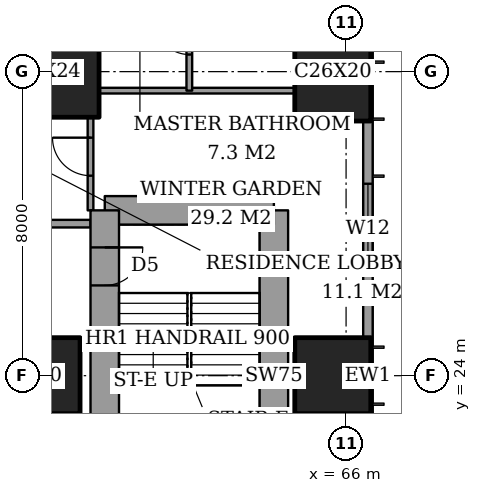
"""IFC4 building model, lengths in metres.
Left out: names, types, materials, properties, quantities, classifications, styles, units other than length and angle.
Written with IfcOpenShell. Run it as: python <this file> out.ifc"""

import sys

from ifc_helpers import new_model, si_unit, direction, frame, frame_2d, origin, origin_2d, place, context, subcontext, project, spatial, rectangle, extrude, element, fill, save


model = new_model("IFC4")
c1 = context("Model", 3, precision=1e-05, world=origin(), true_north=direction((0.0, 1.0)))
c2 = subcontext(c1, "Body", "Model", "MODEL_VIEW")
j1 = project(units=[si_unit("LENGTHUNIT", "METRE"), si_unit("PLANEANGLEUNIT", "RADIAN")], contexts=[c1])
p1 = place(None, origin())
s1 = spatial("IfcSite", under=j1, at=p1, CompositionType="ELEMENT")
p2 = place(p1, origin())
s2 = spatial("IfcBuilding", under=s1, at=p2, CompositionType="ELEMENT")
p3 = place(p2, frame((0.0, 0.0, 164.6)))
s3 = spatial("IfcBuildingStorey", under=s2, at=p3, CompositionType="ELEMENT", Elevation=164.6)
p4 = place(p3, frame((58.0, 24.0, 0.0), z_axis=(0.0, 0.0, 1.0), x_axis=(1.0, 0.0, 0.0)))
e1 = element("IfcColumn", 1, at=p4, inside=s3, PredefinedType="COLUMN", context=c2, shape_type="SweptSolid", body=[
    extrude(rectangle(XDim=2.0, YDim=2.0, at=origin_2d()), origin(), (0.0, 0.0, 1.0), 3.6),
])
p5 = place(p3, frame((58.0, 32.0, 0.0), z_axis=(0.0, 0.0, 1.0), x_axis=(1.0, 0.0, 0.0)))
e2 = element("IfcColumn", 2, at=p5, inside=s3, PredefinedType="COLUMN", context=c2, shape_type="SweptSolid", body=[
    extrude(rectangle(XDim=3.0, YDim=2.4, at=origin_2d()), origin(), (0.0, 0.0, 1.0), 3.6),
])
p6 = place(p3, frame((65.65, 24.0, 0.0), z_axis=(0.0, 0.0, 1.0), x_axis=(1.0, 0.0, 0.0)))
e3 = element("IfcColumn", 3, at=p6, inside=s3, PredefinedType="COLUMN", context=c2, shape_type="SweptSolid", body=[
    extrude(rectangle(XDim=2.0, YDim=2.0, at=origin_2d()), origin(), (0.0, 0.0, 1.0), 3.6),
])
p7 = place(p3, frame((65.65, 32.0, 0.0), z_axis=(0.0, 0.0, 1.0), x_axis=(0.0, 1.0, 0.0)))
e4 = element("IfcColumn", 4, at=p7, inside=s3, PredefinedType="COLUMN", context=c2, shape_type="SweptSolid", body=[
    extrude(rectangle(XDim=2.6, YDim=2.0, at=origin_2d()), origin(), (0.0, 0.0, 1.0), 3.6),
])
p8 = place(p3, frame((64.1, 19.65, 0.0), z_axis=(0.0, 0.0, 1.0), x_axis=(0.0, 1.0, 0.0)))
e5 = element("IfcWall", 5, at=p8, inside=s3, PredefinedType="SHEAR", context=c2, shape_type="SweptSolid", body=[
    extrude(rectangle(XDim=8.7, YDim=0.75, at=frame_2d((4.35, 0.0))), origin(), (0.0, 0.0, 1.0), 3.6),
])
p9 = place(p3, frame((64.1, 28.35, 0.0), z_axis=(0.0, 0.0, 1.0), x_axis=(-1.0, 0.0, 0.0)))
e6 = element("IfcWall", 6, at=p9, inside=s3, PredefinedType="SHEAR", context=c2, shape_type="SweptSolid", body=[
    extrude(rectangle(XDim=4.45, YDim=0.75, at=frame_2d((2.225, 0.0))), origin(), (0.0, 0.0, 1.0), 3.6),
])
p10 = place(p3, frame((59.65, 28.35, 0.0), z_axis=(0.0, 0.0, 1.0), x_axis=(0.0, -1.0, 0.0)))
e7 = element("IfcWall", 7, at=p10, inside=s3, PredefinedType="SHEAR", context=c2, shape_type="SweptSolid", body=[
    extrude(rectangle(XDim=8.7, YDim=0.75, at=frame_2d((4.35, 0.0))), origin(), (0.0, 0.0, 1.0), 3.6),
])
p11 = place(p10, frame((0.975, 0.0, 0.0)))
e8 = element("IfcOpeningElement", 8, at=p11, cuts=e7, PredefinedType="OPENING", context=c2, shape_type="SweptSolid", body=[
    extrude(rectangle(XDim=1.0, YDim=2.1, at=frame_2d((0.5, 1.05))), frame((0.0, 0.385, 0.0), z_axis=(0.0, -1.0, 0.0), x_axis=(1.0, 0.0, 0.0)), (0.0, 0.0, 1.0), 0.77),
])
p12 = place(p3, frame((66.575, 3.175, 0.0), z_axis=(0.0, 0.0, 1.0), x_axis=(0.0, 1.0, 0.0)))
e9 = element("IfcWall", 9, at=p12, inside=s3, PredefinedType="SOLIDWALL", context=c2, shape_type="SweptSolid", body=[
    extrude(rectangle(XDim=41.65, YDim=0.25, at=frame_2d((20.825, 0.0))), origin(), (0.0, 0.0, 1.0), 3.6),
])
p13 = place(p12, frame((0.775, 0.0, 0.4)))
e10 = element("IfcOpeningElement", 10, at=p13, cuts=e9, PredefinedType="OPENING", context=c2, shape_type="SweptSolid", body=[
    extrude(rectangle(XDim=2.4, YDim=2.2, at=frame_2d((1.2, 1.1))), frame((0.0, 0.135, 0.0), z_axis=(0.0, -1.0, 0.0), x_axis=(1.0, 0.0, 0.0)), (0.0, 0.0, 1.0), 0.27),
])
p14 = place(p12, frame((6.225, 0.0, 0.4)))
e11 = element("IfcOpeningElement", 11, at=p14, cuts=e9, PredefinedType="OPENING", context=c2, shape_type="SweptSolid", body=[
    extrude(rectangle(XDim=1.2, YDim=2.2, at=frame_2d((0.6, 1.1))), frame((0.0, 0.135, 0.0), z_axis=(0.0, -1.0, 0.0), x_axis=(1.0, 0.0, 0.0)), (0.0, 0.0, 1.0), 0.27),
])
p15 = place(p12, frame((8.475, 0.0, 0.4)))
e12 = element("IfcOpeningElement", 12, at=p15, cuts=e9, PredefinedType="OPENING", context=c2, shape_type="SweptSolid", body=[
    extrude(rectangle(XDim=2.4, YDim=2.2, at=frame_2d((1.2, 1.1))), frame((0.0, 0.135, 0.0), z_axis=(0.0, -1.0, 0.0), x_axis=(1.0, 0.0, 0.0)), (0.0, 0.0, 1.0), 0.27),
])
p16 = place(p12, frame((15.775, 0.0, 0.4)))
e13 = element("IfcOpeningElement", 13, at=p16, cuts=e9, PredefinedType="OPENING", context=c2, shape_type="SweptSolid", body=[
    extrude(rectangle(XDim=2.4, YDim=2.2, at=frame_2d((1.2, 1.1))), frame((0.0, 0.135, 0.0), z_axis=(0.0, -1.0, 0.0), x_axis=(1.0, 0.0, 0.0)), (0.0, 0.0, 1.0), 0.27),
])
p17 = place(p12, frame((23.475, 0.0, 0.4)))
e14 = element("IfcOpeningElement", 14, at=p17, cuts=e9, PredefinedType="OPENING", context=c2, shape_type="SweptSolid", body=[
    extrude(rectangle(XDim=2.4, YDim=2.2, at=frame_2d((1.2, 1.1))), frame((0.0, 0.135, 0.0), z_axis=(0.0, -1.0, 0.0), x_axis=(1.0, 0.0, 0.0)), (0.0, 0.0, 1.0), 0.27),
])
p18 = place(p12, frame((30.975, 0.0, 0.4)))
e15 = element("IfcOpeningElement", 15, at=p18, cuts=e9, PredefinedType="OPENING", context=c2, shape_type="SweptSolid", body=[
    extrude(rectangle(XDim=2.4, YDim=2.2, at=frame_2d((1.2, 1.1))), frame((0.0, 0.135, 0.0), z_axis=(0.0, -1.0, 0.0), x_axis=(1.0, 0.0, 0.0)), (0.0, 0.0, 1.0), 0.27),
])
p19 = place(p12, frame((34.5, 0.0, 0.4)))
e16 = element("IfcOpeningElement", 16, at=p19, cuts=e9, PredefinedType="OPENING", context=c2, shape_type="SweptSolid", body=[
    extrude(rectangle(XDim=1.2, YDim=2.2, at=frame_2d((0.6, 1.1))), frame((0.0, 0.135, 0.0), z_axis=(0.0, -1.0, 0.0), x_axis=(1.0, 0.0, 0.0)), (0.0, 0.0, 1.0), 0.27),
])
p20 = place(p12, frame((38.475, 0.0, 0.4)))
e17 = element("IfcOpeningElement", 17, at=p20, cuts=e9, PredefinedType="OPENING", context=c2, shape_type="SweptSolid", body=[
    extrude(rectangle(XDim=2.4, YDim=2.2, at=frame_2d((1.2, 1.1))), frame((0.0, 0.135, 0.0), z_axis=(0.0, -1.0, 0.0), x_axis=(1.0, 0.0, 0.0)), (0.0, 0.0, 1.0), 0.27),
])
p21 = place(p3, frame((42.0, 28.0, 0.0), z_axis=(0.0, 0.0, 1.0), x_axis=(1.0, 0.0, 0.0)))
e18 = element("IfcWall", 18, at=p21, inside=s3, PredefinedType="PARTITIONING", context=c2, shape_type="SweptSolid", body=[
    extrude(rectangle(XDim=17.275, YDim=0.2, at=frame_2d((8.637, 0.0))), origin(), (0.0, 0.0, 1.0), 3.35),
])
p22 = place(p21, frame((9.1, 0.0, 0.0)))
e19 = element("IfcOpeningElement", 19, at=p22, cuts=e18, PredefinedType="OPENING", context=c2, shape_type="SweptSolid", body=[
    extrude(rectangle(XDim=1.2, YDim=2.4, at=frame_2d((0.6, 1.2))), frame((0.0, 0.11, 0.0), z_axis=(0.0, -1.0, 0.0), x_axis=(1.0, 0.0, 0.0)), (0.0, 0.0, 1.0), 0.22),
])
p23 = place(p3, frame((59.5, 31.5, 0.0), z_axis=(0.0, 0.0, 1.0), x_axis=(1.0, 0.0, 0.0)))
e20 = element("IfcWall", 20, at=p23, inside=s3, PredefinedType="PARTITIONING", context=c2, shape_type="SweptSolid", body=[
    extrude(rectangle(XDim=5.15, YDim=0.15, at=frame_2d((2.575, 0.0))), origin(), (0.0, 0.0, 1.0), 3.35),
])
p24 = place(p3, frame((59.275, 28.35, 0.0), z_axis=(0.0, 0.0, 1.0), x_axis=(0.0, 1.0, 0.0)))
e21 = element("IfcWall", 21, at=p24, inside=s3, PredefinedType="PARTITIONING", context=c2, shape_type="SweptSolid", body=[
    extrude(rectangle(XDim=2.45, YDim=0.15, at=frame_2d((1.225, 0.0))), origin(), (0.0, 0.0, 1.0), 3.35),
])
p25 = place(p24, frame((0.913, 0.0, 0.0)))
e22 = element("IfcOpeningElement", 22, at=p25, cuts=e21, PredefinedType="OPENING", context=c2, shape_type="SweptSolid", body=[
    extrude(rectangle(XDim=1.0, YDim=2.1, at=frame_2d((0.5, 1.05))), frame((0.0, 0.085, 0.0), z_axis=(0.0, -1.0, 0.0), x_axis=(1.0, 0.0, 0.0)), (0.0, 0.0, 1.0), 0.17),
])
p26 = place(p3, frame((61.875, 31.5, 0.0), z_axis=(0.0, 0.0, 1.0), x_axis=(0.0, 1.0, 0.0)))
e23 = element("IfcWall", 23, at=p26, inside=s3, PredefinedType="PARTITIONING", context=c2, shape_type="SweptSolid", body=[
    extrude(rectangle(XDim=2.8, YDim=0.15, at=frame_2d((1.4, 0.0))), origin(), (0.0, 0.0, 1.0), 3.35),
])
p27 = place(p26, frame((0.95, 0.0, 0.0)))
e24 = element("IfcOpeningElement", 24, at=p27, cuts=e23, PredefinedType="OPENING", context=c2, shape_type="SweptSolid", body=[
    extrude(rectangle(XDim=0.9, YDim=2.1, at=frame_2d((0.45, 1.05))), frame((0.0, 0.085, 0.0), z_axis=(0.0, -1.0, 0.0), x_axis=(1.0, 0.0, 0.0)), (0.0, 0.0, 1.0), 0.17),
])
p28 = place(p17, origin())
e25 = element("IfcWindow", 25, at=p28, inside=s3, PartitioningType="SINGLE_PANEL", PredefinedType="WINDOW", context=c2, shape_type="SweptSolid", body=[
    extrude(rectangle(XDim=2.4, YDim=2.2, at=frame_2d((1.2, 1.1))), frame((0.0, 0.03, 0.0), z_axis=(0.0, -1.0, 0.0), x_axis=(1.0, 0.0, 0.0)), (0.0, 0.0, 1.0), 0.06),
])
fill(e14, e25)
p29 = place(p27, origin())
e26 = element("IfcDoor", 26, at=p29, inside=s3, OperationType="SINGLE_SWING_LEFT", PredefinedType="DOOR", context=c2, shape_type="SweptSolid", body=[
    extrude(rectangle(XDim=0.9, YDim=2.1, at=frame_2d((0.45, 1.05))), frame((0.0, 0.025, 0.0), z_axis=(0.0, -1.0, 0.0), x_axis=(1.0, 0.0, 0.0)), (0.0, 0.0, 1.0), 0.05),
])
fill(e24, e26)
p30 = place(p25, origin())
e27 = element("IfcDoor", 27, at=p30, inside=s3, OperationType="SINGLE_SWING_LEFT", PredefinedType="DOOR", context=c2, shape_type="SweptSolid", body=[
    extrude(rectangle(XDim=1.0, YDim=2.1, at=frame_2d((0.5, 1.05))), frame((0.0, 0.025, 0.0), z_axis=(0.0, -1.0, 0.0), x_axis=(1.0, 0.0, 0.0)), (0.0, 0.0, 1.0), 0.05),
])
fill(e22, e27)
p31 = place(p11, origin())
e28 = element("IfcDoor", 28, at=p31, inside=s3, OperationType="SINGLE_SWING_RIGHT", PredefinedType="DOOR", context=c2, shape_type="SweptSolid", body=[
    extrude(rectangle(XDim=1.0, YDim=2.1, at=frame_2d((0.5, 1.05))), frame((0.0, 0.025, 0.0), z_axis=(0.0, -1.0, 0.0), x_axis=(1.0, 0.0, 0.0)), (0.0, 0.0, 1.0), 0.05),
])
fill(e8, e28)
save(model, sys.argv[1])
